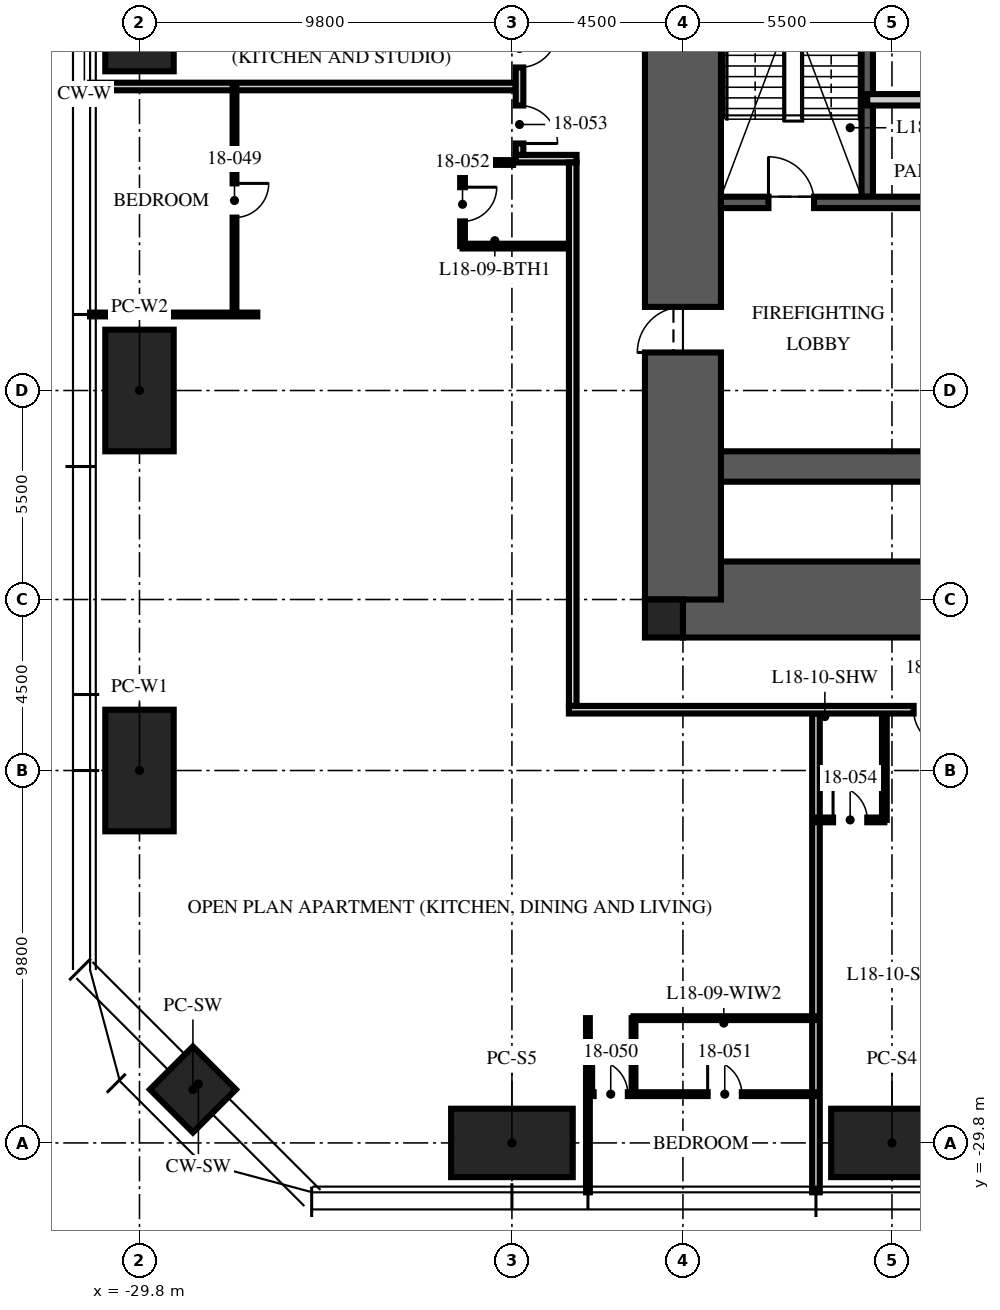
"""IFC4 building model, lengths in metres.
Left out: names, types, materials, properties, quantities, classifications, styles, units other than length and angle.
Written with IfcOpenShell. Run it as: python <this file> out.ifc"""

import sys

from ifc_helpers import new_model, si_unit, direction, frame, frame_2d, origin, origin_2d, place, context, subcontext, project, spatial, rectangle, hollow_rectangle, extrude, element, fill, save


model = new_model("IFC4")
c1 = context("Model", 3, precision=1e-05, world=origin(), true_north=direction((0.0, 1.0)))
c2 = subcontext(c1, "Body", "Model", "MODEL_VIEW")
j1 = project(units=[si_unit("LENGTHUNIT", "METRE"), si_unit("PLANEANGLEUNIT", "RADIAN")], contexts=[c1])
p1 = place(None, origin())
s1 = spatial("IfcSite", under=j1, at=p1, CompositionType="ELEMENT")
p2 = place(p1, origin())
s2 = spatial("IfcBuilding", under=s1, at=p2, CompositionType="ELEMENT")
p3 = place(p2, frame((0.0, 0.0, 73.5)))
s3 = spatial("IfcBuildingStorey", under=s2, at=p3, CompositionType="ELEMENT", Elevation=73.5)
p4 = place(p3, frame((-15.5, -15.5, -0.25), z_axis=(0.0, 0.0, 1.0), x_axis=(1.0, 0.0, 0.0)))
e1 = element("IfcWall", 1, at=p4, inside=s3, PredefinedType="SHEAR", context=c2, shape_type="SweptSolid", body=[
    extrude(rectangle(XDim=31.0, YDim=2.0, at=frame_2d((15.5, 0.0))), origin(), (0.0, 0.0, 1.0), 3.75),
])
p5 = place(p3, frame((-15.5, -12.0, -0.25), z_axis=(0.0, 0.0, 1.0), x_axis=(1.0, 0.0, 0.0)))
e2 = element("IfcWall", 2, at=p5, inside=s3, PredefinedType="SHEAR", context=c2, shape_type="SweptSolid", body=[
    extrude(rectangle(XDim=31.0, YDim=0.8, at=frame_2d((15.5, 0.0))), origin(), (0.0, 0.0, 1.0), 3.75),
])
p6 = place(p3, frame((-15.5, -15.5, -0.25), z_axis=(0.0, 0.0, 1.0), x_axis=(0.0, 1.0, 0.0)))
e3 = element("IfcWall", 3, at=p6, inside=s3, PredefinedType="SHEAR", context=c2, shape_type="SweptSolid", body=[
    extrude(rectangle(XDim=31.0, YDim=2.0, at=frame_2d((15.5, 0.0))), origin(), (0.0, 0.0, 1.0), 3.75),
])
p7 = place(p6, frame((6.5, 0.0, 0.25)))
e4 = element("IfcOpeningElement", 4, at=p7, cuts=e3, PredefinedType="OPENING", context=c2, shape_type="SweptSolid", body=[
    extrude(rectangle(XDim=1.2, YDim=2.1, at=frame_2d((0.6, 1.05))), frame((0.0, 1.01, 0.0), z_axis=(0.0, -1.0, 0.0), x_axis=(1.0, 0.0, 0.0)), (0.0, 0.0, 1.0), 2.02),
])
p8 = place(p6, frame((23.0, 0.0, 0.25)))
e5 = element("IfcOpeningElement", 5, at=p8, cuts=e3, PredefinedType="OPENING", context=c2, shape_type="SweptSolid", body=[
    extrude(rectangle(XDim=1.8, YDim=2.1, at=frame_2d((0.9, 1.05))), frame((0.0, 1.01, 0.0), z_axis=(0.0, -1.0, 0.0), x_axis=(1.0, 0.0, 0.0)), (0.0, 0.0, 1.0), 2.02),
])
p9 = place(p3, frame((-16.0, -16.0, -0.25), z_axis=(0.0, 0.0, 1.0), x_axis=(1.0, 0.0, 0.0)))
e6 = element("IfcColumn", 6, at=p9, inside=s3, PredefinedType="COLUMN", context=c2, shape_type="SweptSolid", body=[
    extrude(rectangle(XDim=1.0, YDim=1.0, at=origin_2d()), origin(), (0.0, 0.0, 1.0), 3.75),
])
for number, where, z_axis, x_axis in (
    (7, (-10.0, -29.8, 0.0), (0.0, 0.0, 1.0), (1.0, 0.0, 0.0)),
    (8, (-20.0, -29.8, 0.0), (0.0, 0.0, 1.0), (1.0, 0.0, 0.0)),
    (9, (-29.8, -20.0, 0.0), (0.0, 0.0, 1.0), (0.0, 1.0, 0.0)),
    (10, (-29.8, -10.0, 0.0), (0.0, 0.0, 1.0), (0.0, 1.0, 0.0)),
    (11, (-29.8, 0.0, 0.0), (0.0, 0.0, 1.0), (0.0, 1.0, 0.0)),
):
    element("IfcColumn", number, at=place(p3, frame(where, z_axis=z_axis, x_axis=x_axis)), inside=s3, PredefinedType="COLUMN", context=c2, shape_type="SweptSolid", body=[
        extrude(hollow_rectangle(XDim=3.2, YDim=1.8, WallThickness=0.2, at=origin_2d()), origin(), (0.0, 0.0, 1.0), 3.75),
    ])
p10 = place(p3, frame((-28.394, -28.394, 0.0), z_axis=(0.0, 0.0, 1.0), x_axis=(0.707106781187, -0.707106781187, 0.0)))
e12 = element("IfcColumn", 12, at=p10, inside=s3, PredefinedType="COLUMN", context=c2, shape_type="SweptSolid", body=[
    extrude(hollow_rectangle(XDim=1.6, YDim=1.6, WallThickness=0.1, at=origin_2d()), origin(), (0.0, 0.0, 1.0), 3.75),
])
p11 = place(p3, frame((-10.65, -4.9, 0.0), z_axis=(0.0, 0.0, 1.0), x_axis=(0.0, 1.0, 0.0)))
e13 = element("IfcWall", 13, at=p11, inside=s3, PredefinedType="SOLIDWALL", context=c2, shape_type="SweptSolid", body=[
    extrude(rectangle(XDim=10.1, YDim=0.3, at=frame_2d((5.05, 0.0))), origin(), (0.0, 0.0, 1.0), 3.5),
])
p12 = place(p3, frame((-14.5, -5.05, 0.0), z_axis=(0.0, 0.0, 1.0), x_axis=(1.0, 0.0, 0.0)))
e14 = element("IfcWall", 14, at=p12, inside=s3, PredefinedType="SOLIDWALL", context=c2, shape_type="SweptSolid", body=[
    extrude(rectangle(XDim=5.7, YDim=0.3, at=frame_2d((2.85, 0.0))), origin(), (0.0, 0.0, 1.0), 3.5),
])
p13 = place(p12, frame((1.25, 0.0, 0.0)))
e15 = element("IfcOpeningElement", 15, at=p13, cuts=e14, PredefinedType="OPENING", context=c2, shape_type="SweptSolid", body=[
    extrude(rectangle(XDim=1.2, YDim=2.1, at=frame_2d((0.6, 1.05))), frame((0.0, 0.16, 0.0), z_axis=(0.0, -1.0, 0.0), x_axis=(1.0, 0.0, 0.0)), (0.0, 0.0, 1.0), 0.32),
])
p14 = place(p3, frame((-10.65, -2.35, 0.0), z_axis=(0.0, 0.0, 1.0), x_axis=(1.0, 0.0, 0.0)))
e16 = element("IfcWall", 16, at=p14, inside=s3, PredefinedType="PARTITIONING", context=c2, shape_type="SweptSolid", body=[
    extrude(rectangle(XDim=5.55, YDim=0.3, at=frame_2d((2.775, 0.0))), origin(), (0.0, 0.0, 1.0), 3.5),
])
p15 = place(p3, frame((-19.9, -2.0, 0.0), z_axis=(0.0, 0.0, 1.0), x_axis=(-1.0, 0.0, 0.0)))
e17 = element("IfcWall", 17, at=p15, inside=s3, PredefinedType="PARTITIONING", context=c2, shape_type="SweptSolid", body=[
    extrude(rectangle(XDim=11.2, YDim=0.2, at=frame_2d((5.6, 0.0))), origin(), (0.0, 0.0, 1.0), 2.71),
])
p16 = place(p3, frame((-26.7, -8.0, 0.0), z_axis=(0.0, 0.0, 1.0), x_axis=(-1.0, 0.0, 0.0)))
e18 = element("IfcWall", 18, at=p16, inside=s3, PredefinedType="PARTITIONING", context=c2, shape_type="SweptSolid", body=[
    extrude(rectangle(XDim=4.4, YDim=0.1, at=frame_2d((2.2, 0.0))), origin(), (0.0, 0.0, 1.0), 2.71),
])
p17 = place(p3, frame((-18.0, -26.517, 0.0), z_axis=(0.0, 0.0, 1.0), x_axis=(0.0, -1.0, 0.0)))
e19 = element("IfcWall", 19, at=p17, inside=s3, PredefinedType="PARTITIONING", context=c2, shape_type="SweptSolid", body=[
    extrude(rectangle(XDim=4.583, YDim=0.1, at=frame_2d((2.292, 0.0))), origin(), (0.0, 0.0, 1.0), 2.71),
])
p18 = place(p3, frame((-12.0, -18.5, 0.0), z_axis=(0.0, 0.0, 1.0), x_axis=(0.0, -1.0, 0.0)))
e20 = element("IfcWall", 20, at=p18, inside=s3, PredefinedType="PARTITIONING", context=c2, shape_type="SweptSolid", body=[
    extrude(rectangle(XDim=12.6, YDim=0.2, at=frame_2d((6.3, 0.0))), origin(), (0.0, 0.0, 1.0), 2.71),
])
p19 = place(p3, frame((-27.3, -2.0, 0.0), z_axis=(0.0, 0.0, 1.0), x_axis=(0.0, -1.0, 0.0)))
e21 = element("IfcWall", 21, at=p19, inside=s3, PredefinedType="PARTITIONING", context=c2, shape_type="SweptSolid", body=[
    extrude(rectangle(XDim=6.0, YDim=0.1, at=frame_2d((3.0, 0.0))), origin(), (0.0, 0.0, 1.0), 2.61),
])
p20 = place(p19, frame((2.55, 0.0, 0.0)))
e22 = element("IfcOpeningElement", 22, at=p20, cuts=e21, PredefinedType="OPENING", context=c2, shape_type="SweptSolid", body=[
    extrude(rectangle(XDim=0.9, YDim=2.1, at=frame_2d((0.45, 1.05))), frame((0.0, 0.06, 0.0), z_axis=(0.0, -1.0, 0.0), x_axis=(1.0, 0.0, 0.0)), (0.0, 0.0, 1.0), 0.12),
])
p21 = place(p3, frame((-18.0, -28.517, 0.0), z_axis=(0.0, 0.0, 1.0), x_axis=(1.0, 0.0, 0.0)))
e23 = element("IfcWall", 23, at=p21, inside=s3, PredefinedType="PARTITIONING", context=c2, shape_type="SweptSolid", body=[
    extrude(rectangle(XDim=6.0, YDim=0.1, at=frame_2d((3.0, 0.0))), origin(), (0.0, 0.0, 1.0), 2.61),
])
p22 = place(p21, frame((0.15, 0.0, 0.0)))
e24 = element("IfcOpeningElement", 24, at=p22, cuts=e23, PredefinedType="OPENING", context=c2, shape_type="SweptSolid", body=[
    extrude(rectangle(XDim=0.9, YDim=2.1, at=frame_2d((0.45, 1.05))), frame((0.0, 0.06, 0.0), z_axis=(0.0, -1.0, 0.0), x_axis=(1.0, 0.0, 0.0)), (0.0, 0.0, 1.0), 0.12),
])
p23 = place(p21, frame((3.15, 0.0, 0.0)))
e25 = element("IfcOpeningElement", 25, at=p23, cuts=e23, PredefinedType="OPENING", context=c2, shape_type="SweptSolid", body=[
    extrude(rectangle(XDim=0.9, YDim=2.1, at=frame_2d((0.45, 1.05))), frame((0.0, 0.06, 0.0), z_axis=(0.0, -1.0, 0.0), x_axis=(1.0, 0.0, 0.0)), (0.0, 0.0, 1.0), 0.12),
])
p24 = place(p3, frame((-16.8, -26.517, 0.0), z_axis=(0.0, 0.0, 1.0), x_axis=(0.0, -1.0, 0.0)))
e26 = element("IfcWall", 26, at=p24, inside=s3, PredefinedType="PARTITIONING", context=c2, shape_type="SweptSolid", body=[
    extrude(rectangle(XDim=2.0, YDim=0.1, at=frame_2d((1.0, 0.0))), origin(), (0.0, 0.0, 1.0), 3.5),
])
p25 = place(p3, frame((-16.8, -26.517, 0.0), z_axis=(0.0, 0.0, 1.0), x_axis=(1.0, 0.0, 0.0)))
e27 = element("IfcWall", 27, at=p25, inside=s3, PredefinedType="PARTITIONING", context=c2, shape_type="SweptSolid", body=[
    extrude(rectangle(XDim=4.8, YDim=0.1, at=frame_2d((2.4, 0.0))), origin(), (0.0, 0.0, 1.0), 2.61),
])
p26 = place(p3, frame((-21.3, -4.0, 0.0), z_axis=(0.0, 0.0, 1.0), x_axis=(0.0, -1.0, 0.0)))
e28 = element("IfcWall", 28, at=p26, inside=s3, PredefinedType="PARTITIONING", context=c2, shape_type="SweptSolid", body=[
    extrude(rectangle(XDim=2.2, YDim=0.125, at=frame_2d((1.1, 0.0))), origin(), (0.0, 0.0, 1.0), 2.61),
])
p27 = place(p26, frame((0.65, 0.0, 0.0)))
e29 = element("IfcOpeningElement", 29, at=p27, cuts=e28, PredefinedType="OPENING", context=c2, shape_type="SweptSolid", body=[
    extrude(rectangle(XDim=0.9, YDim=2.1, at=frame_2d((0.45, 1.05))), frame((0.0, 0.073, 0.0), z_axis=(0.0, -1.0, 0.0), x_axis=(1.0, 0.0, 0.0)), (0.0, 0.0, 1.0), 0.145),
])
p28 = place(p3, frame((-19.97, -4.0, 0.0), z_axis=(0.0, 0.0, 1.0), x_axis=(-1.0, 0.0, 0.0)))
e30 = element("IfcWall", 30, at=p28, inside=s3, PredefinedType="PARTITIONING", context=c2, shape_type="SweptSolid", body=[
    extrude(rectangle(XDim=1.33, YDim=0.125, at=frame_2d((0.665, 0.0))), origin(), (0.0, 0.0, 1.0), 3.5),
])
p29 = place(p3, frame((-18.5, -6.2, 0.0), z_axis=(0.0, 0.0, 1.0), x_axis=(-1.0, 0.0, 0.0)))
e31 = element("IfcWall", 31, at=p29, inside=s3, PredefinedType="PARTITIONING", context=c2, shape_type="SweptSolid", body=[
    extrude(rectangle(XDim=2.8, YDim=0.125, at=frame_2d((1.4, 0.0))), origin(), (0.0, 0.0, 1.0), 3.5),
])
p30 = place(p3, frame((-12.0, -21.3, 0.0), z_axis=(0.0, 0.0, 1.0), x_axis=(1.0, 0.0, 0.0)))
e32 = element("IfcWall", 32, at=p30, inside=s3, PredefinedType="PARTITIONING", context=c2, shape_type="SweptSolid", body=[
    extrude(rectangle(XDim=1.8, YDim=0.125, at=frame_2d((0.9, 0.0))), origin(), (0.0, 0.0, 1.0), 3.5),
])
p31 = place(p30, frame((0.45, 0.0, 0.0)))
e33 = element("IfcOpeningElement", 33, at=p31, cuts=e32, PredefinedType="OPENING", context=c2, shape_type="SweptSolid", body=[
    extrude(rectangle(XDim=0.9, YDim=2.1, at=frame_2d((0.45, 1.05))), frame((0.0, 0.073, 0.0), z_axis=(0.0, -1.0, 0.0), x_axis=(1.0, 0.0, 0.0)), (0.0, 0.0, 1.0), 0.145),
])
p32 = place(p3, frame((-10.2, -18.5, 0.0), z_axis=(0.0, 0.0, 1.0), x_axis=(0.0, -1.0, 0.0)))
e34 = element("IfcWall", 34, at=p32, inside=s3, PredefinedType="PARTITIONING", context=c2, shape_type="SweptSolid", body=[
    extrude(rectangle(XDim=2.8, YDim=0.125, at=frame_2d((1.4, 0.0))), origin(), (0.0, 0.0, 1.0), 2.492),
])
p33 = place(p3, frame((-18.3, -3.9, 0.0), z_axis=(0.0, 0.0, 1.0), x_axis=(-1.0, 0.0, 0.0)))
e35 = element("IfcWall", 35, at=p33, inside=s3, PredefinedType="PARTITIONING", context=c2, shape_type="SweptSolid", body=[
    extrude(rectangle(XDim=1.6, YDim=0.2, at=frame_2d((0.8, 0.0))), origin(), (0.0, 0.0, 1.0), 3.5),
])
p34 = place(p3, frame((-19.8, -0.2, 0.0), z_axis=(0.0, 0.0, 1.0), x_axis=(0.0, -1.0, 0.0)))
e36 = element("IfcWall", 36, at=p34, inside=s3, PredefinedType="PARTITIONING", context=c2, shape_type="SweptSolid", body=[
    extrude(rectangle(XDim=3.6, YDim=0.2, at=frame_2d((1.8, 0.0))), origin(), (0.0, 0.0, 1.0), 3.5),
])
p35 = place(p34, frame((0.3, 0.0, 0.0)))
e37 = element("IfcOpeningElement", 37, at=p35, cuts=e36, PredefinedType="OPENING", context=c2, shape_type="SweptSolid", body=[
    extrude(rectangle(XDim=1.0, YDim=2.2, at=frame_2d((0.5, 1.1))), frame((0.0, 0.11, 0.0), z_axis=(0.0, -1.0, 0.0), x_axis=(1.0, 0.0, 0.0)), (0.0, 0.0, 1.0), 0.22),
])
p36 = place(p34, frame((2.3, 0.0, 0.0)))
e38 = element("IfcOpeningElement", 38, at=p36, cuts=e36, PredefinedType="OPENING", context=c2, shape_type="SweptSolid", body=[
    extrude(rectangle(XDim=1.0, YDim=2.2, at=frame_2d((0.5, 1.1))), frame((0.0, 0.11, 0.0), z_axis=(0.0, -1.0, 0.0), x_axis=(1.0, 0.0, 0.0)), (0.0, 0.0, 1.0), 0.22),
])
p37 = place(p3, frame((-18.4, -4.0, 0.0), z_axis=(0.0, 0.0, 1.0), x_axis=(0.0, -1.0, 0.0)))
e39 = element("IfcWall", 39, at=p37, inside=s3, PredefinedType="PARTITIONING", context=c2, shape_type="SweptSolid", body=[
    extrude(rectangle(XDim=14.3, YDim=0.2, at=frame_2d((7.15, 0.0))), origin(), (0.0, 0.0, 1.0), 2.3),
])
p38 = place(p3, frame((18.5, -18.4, 0.0), z_axis=(0.0, 0.0, 1.0), x_axis=(-1.0, 0.0, 0.0)))
e40 = element("IfcWall", 40, at=p38, inside=s3, PredefinedType="PARTITIONING", context=c2, shape_type="SweptSolid", body=[
    extrude(rectangle(XDim=37.0, YDim=0.2, at=frame_2d((18.5, 0.0))), origin(), (0.0, 0.0, 1.0), 2.3),
])
p39 = place(p38, frame((26.93, 0.0, 0.0)))
e41 = element("IfcOpeningElement", 41, at=p39, cuts=e40, PredefinedType="OPENING", context=c2, shape_type="SweptSolid", body=[
    extrude(rectangle(XDim=1.0, YDim=2.2, at=frame_2d((0.5, 1.1))), frame((0.0, 0.11, 0.0), z_axis=(0.0, -1.0, 0.0), x_axis=(1.0, 0.0, 0.0)), (0.0, 0.0, 1.0), 0.22),
])
p40 = place(p38, frame((20.93, 0.0, 0.0)))
e42 = element("IfcOpeningElement", 42, at=p40, cuts=e40, PredefinedType="OPENING", context=c2, shape_type="SweptSolid", body=[
    extrude(rectangle(XDim=1.0, YDim=2.2, at=frame_2d((0.5, 1.1))), frame((0.0, 0.11, 0.0), z_axis=(0.0, -1.0, 0.0), x_axis=(1.0, 0.0, 0.0)), (0.0, 0.0, 1.0), 0.22),
])
p41 = place(p38, frame((16.93, 0.0, 0.0)))
e43 = element("IfcOpeningElement", 43, at=p41, cuts=e40, PredefinedType="OPENING", context=c2, shape_type="SweptSolid", body=[
    extrude(rectangle(XDim=1.0, YDim=2.2, at=frame_2d((0.5, 1.1))), frame((0.0, 0.11, 0.0), z_axis=(0.0, -1.0, 0.0), x_axis=(1.0, 0.0, 0.0)), (0.0, 0.0, 1.0), 0.22),
])
p42 = place(p13, origin())
e44 = element("IfcDoor", 44, at=p42, inside=s3, OperationType="SINGLE_SWING_LEFT", PredefinedType="DOOR", context=c2, shape_type="SweptSolid", body=[
    extrude(rectangle(XDim=1.2, YDim=2.1, at=frame_2d((0.6, 1.05))), frame((0.0, 0.025, 0.0), z_axis=(0.0, -1.0, 0.0), x_axis=(1.0, 0.0, 0.0)), (0.0, 0.0, 1.0), 0.05),
])
fill(e15, e44)
p43 = place(p7, origin())
e45 = element("IfcDoor", 45, at=p43, inside=s3, OperationType="SINGLE_SWING_LEFT", PredefinedType="DOOR", context=c2, shape_type="SweptSolid", body=[
    extrude(rectangle(XDim=1.2, YDim=2.1, at=frame_2d((0.6, 1.05))), frame((0.0, 0.025, 0.0), z_axis=(0.0, -1.0, 0.0), x_axis=(1.0, 0.0, 0.0)), (0.0, 0.0, 1.0), 0.05),
])
fill(e4, e45)
p44 = place(p35, origin())
e46 = element("IfcDoor", 46, at=p44, inside=s3, OperationType="SINGLE_SWING_LEFT", PredefinedType="DOOR", context=c2, shape_type="SweptSolid", body=[
    extrude(rectangle(XDim=1.0, YDim=2.2, at=frame_2d((0.5, 1.1))), frame((0.0, 0.025, 0.0), z_axis=(0.0, -1.0, 0.0), x_axis=(1.0, 0.0, 0.0)), (0.0, 0.0, 1.0), 0.05),
])
fill(e37, e46)
p45 = place(p20, origin())
e47 = element("IfcDoor", 47, at=p45, inside=s3, OperationType="SINGLE_SWING_LEFT", PredefinedType="DOOR", context=c2, shape_type="SweptSolid", body=[
    extrude(rectangle(XDim=0.9, YDim=2.1, at=frame_2d((0.45, 1.05))), frame((0.0, 0.025, 0.0), z_axis=(0.0, -1.0, 0.0), x_axis=(1.0, 0.0, 0.0)), (0.0, 0.0, 1.0), 0.05),
])
fill(e22, e47)
p46 = place(p22, origin())
e48 = element("IfcDoor", 48, at=p46, inside=s3, OperationType="SINGLE_SWING_LEFT", PredefinedType="DOOR", context=c2, shape_type="SweptSolid", body=[
    extrude(rectangle(XDim=0.9, YDim=2.1, at=frame_2d((0.45, 1.05))), frame((0.0, 0.025, 0.0), z_axis=(0.0, -1.0, 0.0), x_axis=(1.0, 0.0, 0.0)), (0.0, 0.0, 1.0), 0.05),
])
fill(e24, e48)
p47 = place(p23, origin())
e49 = element("IfcDoor", 49, at=p47, inside=s3, OperationType="SINGLE_SWING_LEFT", PredefinedType="DOOR", context=c2, shape_type="SweptSolid", body=[
    extrude(rectangle(XDim=0.9, YDim=2.1, at=frame_2d((0.45, 1.05))), frame((0.0, 0.025, 0.0), z_axis=(0.0, -1.0, 0.0), x_axis=(1.0, 0.0, 0.0)), (0.0, 0.0, 1.0), 0.05),
])
fill(e25, e49)
p48 = place(p27, origin())
e50 = element("IfcDoor", 50, at=p48, inside=s3, OperationType="SINGLE_SWING_LEFT", PredefinedType="DOOR", context=c2, shape_type="SweptSolid", body=[
    extrude(rectangle(XDim=0.9, YDim=2.1, at=frame_2d((0.45, 1.05))), frame((0.0, 0.025, 0.0), z_axis=(0.0, -1.0, 0.0), x_axis=(1.0, 0.0, 0.0)), (0.0, 0.0, 1.0), 0.05),
])
fill(e29, e50)
p49 = place(p36, origin())
e51 = element("IfcDoor", 51, at=p49, inside=s3, OperationType="SINGLE_SWING_RIGHT", PredefinedType="DOOR", context=c2, shape_type="SweptSolid", body=[
    extrude(rectangle(XDim=1.0, YDim=2.2, at=frame_2d((0.5, 1.1))), frame((0.0, 0.025, 0.0), z_axis=(0.0, -1.0, 0.0), x_axis=(1.0, 0.0, 0.0)), (0.0, 0.0, 1.0), 0.05),
])
fill(e38, e51)
p50 = place(p31, origin())
e52 = element("IfcDoor", 52, at=p50, inside=s3, OperationType="SINGLE_SWING_LEFT", PredefinedType="DOOR", context=c2, shape_type="SweptSolid", body=[
    extrude(rectangle(XDim=0.9, YDim=2.1, at=frame_2d((0.45, 1.05))), frame((0.0, 0.025, 0.0), z_axis=(0.0, -1.0, 0.0), x_axis=(1.0, 0.0, 0.0)), (0.0, 0.0, 1.0), 0.05),
])
fill(e33, e52)
p51 = place(p39, origin())
e53 = element("IfcDoor", 53, at=p51, inside=s3, OperationType="SINGLE_SWING_LEFT", PredefinedType="DOOR", context=c2, shape_type="SweptSolid", body=[
    extrude(rectangle(XDim=1.0, YDim=2.2, at=frame_2d((0.5, 1.1))), frame((0.0, 0.025, 0.0), z_axis=(0.0, -1.0, 0.0), x_axis=(1.0, 0.0, 0.0)), (0.0, 0.0, 1.0), 0.05),
])
fill(e41, e53)
save(model, sys.argv[1])
